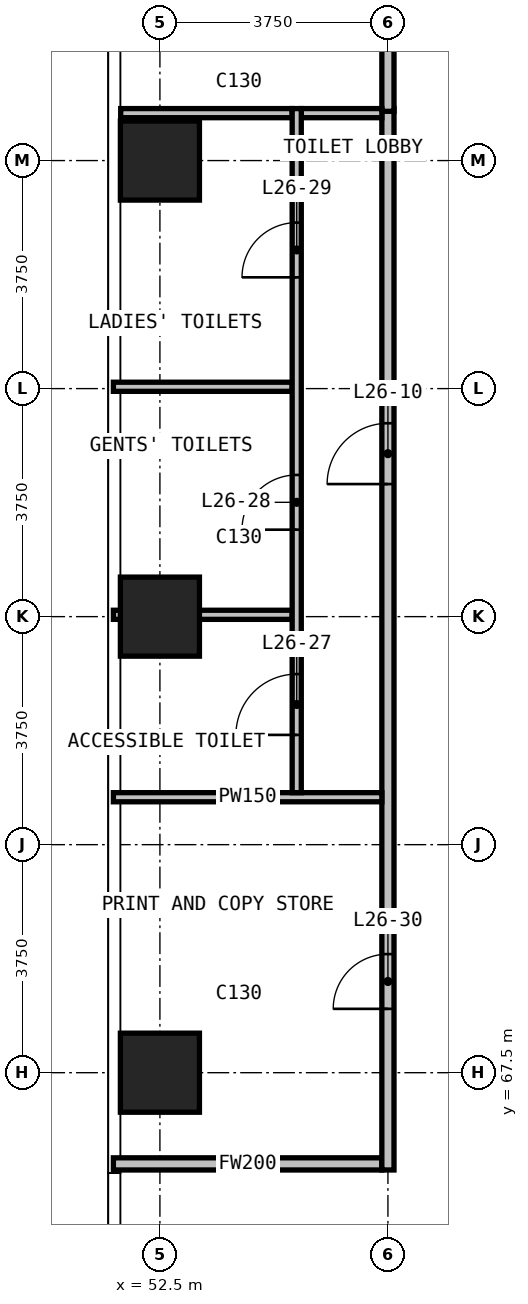
"""IFC4 building model, lengths in metres.
Left out: names, types, materials, properties, quantities, classifications, styles, units other than length and angle.
Written with IfcOpenShell. Run it as: python <this file> out.ifc"""

import sys

from ifc_helpers import new_model, si_unit, direction, frame, frame_2d, origin, origin_2d, place, context, subcontext, project, spatial, rectangle, extrude, element, fill, save


model = new_model("IFC4")
c1 = context("Model", 3, precision=1e-05, world=origin(), true_north=direction((0.0, 1.0)))
c2 = subcontext(c1, "Body", "Model", "MODEL_VIEW")
j1 = project(units=[si_unit("LENGTHUNIT", "METRE"), si_unit("PLANEANGLEUNIT", "RADIAN")], contexts=[c1])
p1 = place(None, origin())
s1 = spatial("IfcSite", under=j1, at=p1, CompositionType="ELEMENT")
p2 = place(p1, origin())
s2 = spatial("IfcBuilding", under=s1, at=p2, CompositionType="ELEMENT")
p3 = place(p2, frame((0.0, 0.0, 107.2)))
s3 = spatial("IfcBuildingStorey", under=s2, at=p3, CompositionType="ELEMENT", Elevation=107.2)
for number, where, z_axis, x_axis in (
    (1, (52.5, 67.5, 0.0), (0.0, 0.0, 1.0), (1.0, 0.0, 0.0)),
    (2, (52.5, 75.0, 0.0), (0.0, 0.0, 1.0), (1.0, 0.0, 0.0)),
    (3, (52.5, 82.5, 0.0), (0.0, 0.0, 1.0), (1.0, 0.0, 0.0)),
):
    element("IfcColumn", number, at=place(p3, frame(where, z_axis=z_axis, x_axis=x_axis)), inside=s3, PredefinedType="COLUMN", context=c2, shape_type="SweptSolid", body=[
        extrude(rectangle(XDim=1.3, YDim=1.3, at=origin_2d()), origin(), (0.0, 0.0, 1.0), 3.6),
    ])
p4 = place(p3, frame((51.735, 66.0, 0.0), z_axis=(0.0, 0.0, 1.0), x_axis=(1.0, 0.0, 0.0)))
e4 = element("IfcWall", 4, at=p4, inside=s3, PredefinedType="PARTITIONING", context=c2, shape_type="SweptSolid", body=[
    extrude(rectangle(XDim=4.415, YDim=0.2, at=frame_2d((2.208, 0.0))), origin(), (0.0, 0.0, 1.0), 3.3),
])
p5 = place(p3, frame((56.25, 65.9, 0.0), z_axis=(0.0, 0.0, 1.0), x_axis=(0.0, 1.0, 0.0)))
e5 = element("IfcWall", 5, at=p5, inside=s3, PredefinedType="PARTITIONING", context=c2, shape_type="SweptSolid", body=[
    extrude(rectangle(XDim=17.455, YDim=0.2, at=frame_2d((8.728, 0.0))), origin(), (0.0, 0.0, 1.0), 3.3),
])
p6 = place(p5, frame((11.28, 0.0, 0.0)))
e6 = element("IfcOpeningElement", 6, at=p6, cuts=e5, PredefinedType="OPENING", context=c2, shape_type="SweptSolid", body=[
    extrude(rectangle(XDim=1.0, YDim=2.2, at=frame_2d((0.5, 1.1))), frame((0.0, 0.11, 0.0), z_axis=(0.0, -1.0, 0.0), x_axis=(1.0, 0.0, 0.0)), (0.0, 0.0, 1.0), 0.22),
])
p7 = place(p5, frame((2.65, 0.0, 0.0)))
e7 = element("IfcOpeningElement", 7, at=p7, cuts=e5, PredefinedType="OPENING", context=c2, shape_type="SweptSolid", body=[
    extrude(rectangle(XDim=0.9, YDim=2.2, at=frame_2d((0.45, 1.1))), frame((0.0, 0.11, 0.0), z_axis=(0.0, -1.0, 0.0), x_axis=(1.0, 0.0, 0.0)), (0.0, 0.0, 1.0), 0.22),
])
p8 = place(p3, frame((56.25, 83.31, 0.0), z_axis=(0.0, 0.0, 1.0), x_axis=(0.0, 1.0, 0.0)))
e8 = element("IfcWall", 8, at=p8, inside=s3, PredefinedType="PARTITIONING", context=c2, shape_type="SweptSolid", body=[
    extrude(rectangle(XDim=7.335, YDim=0.2, at=frame_2d((3.667, 0.0))), origin(), (0.0, 0.0, 1.0), 3.3),
])
p9 = place(p3, frame((51.735, 72.03, 0.0), z_axis=(0.0, 0.0, 1.0), x_axis=(1.0, 0.0, 0.0)))
e9 = element("IfcWall", 9, at=p9, inside=s3, PredefinedType="PARTITIONING", context=c2, shape_type="SweptSolid", body=[
    extrude(rectangle(XDim=4.415, YDim=0.15, at=frame_2d((2.208, 0.0))), origin(), (0.0, 0.0, 1.0), 3.3),
])
for number, where, z_axis, x_axis in (
    (10, (51.735, 75.03, 0.0), (0.0, 0.0, 1.0), (1.0, 0.0, 0.0)),
    (11, (51.735, 78.78, 0.0), (0.0, 0.0, 1.0), (1.0, 0.0, 0.0)),
):
    element("IfcWall", number, at=place(p3, frame(where, z_axis=z_axis, x_axis=x_axis)), inside=s3, PredefinedType="PARTITIONING", context=c2, shape_type="SweptSolid", body=[
        extrude(rectangle(XDim=2.94, YDim=0.15, at=frame_2d((1.47, 0.0))), origin(), (0.0, 0.0, 1.0), 3.3),
    ])
p10 = place(p3, frame((51.855, 83.28, 0.0), z_axis=(0.0, 0.0, 1.0), x_axis=(1.0, 0.0, 0.0)))
e12 = element("IfcWall", 12, at=p10, inside=s3, PredefinedType="PARTITIONING", context=c2, shape_type="SweptSolid", body=[
    extrude(rectangle(XDim=2.82, YDim=0.15, at=frame_2d((1.41, 0.0))), origin(), (0.0, 0.0, 1.0), 3.3),
])
p11 = place(p3, frame((54.825, 83.28, 0.0), z_axis=(0.0, 0.0, 1.0), x_axis=(1.0, 0.0, 0.0)))
e13 = element("IfcWall", 13, at=p11, inside=s3, PredefinedType="PARTITIONING", context=c2, shape_type="SweptSolid", body=[
    extrude(rectangle(XDim=1.325, YDim=0.15, at=frame_2d((0.663, 0.0))), origin(), (0.0, 0.0, 1.0), 3.3),
])
p12 = place(p3, frame((54.75, 72.105, 0.0), z_axis=(0.0, 0.0, 1.0), x_axis=(0.0, 1.0, 0.0)))
e14 = element("IfcWall", 14, at=p12, inside=s3, PredefinedType="PARTITIONING", context=c2, shape_type="SweptSolid", body=[
    extrude(rectangle(XDim=11.25, YDim=0.15, at=frame_2d((5.625, 0.0))), origin(), (0.0, 0.0, 1.0), 3.3),
])
p13 = place(p12, frame((0.95, 0.0, 0.0)))
e15 = element("IfcOpeningElement", 15, at=p13, cuts=e14, PredefinedType="OPENING", context=c2, shape_type="SweptSolid", body=[
    extrude(rectangle(XDim=1.0, YDim=2.2, at=frame_2d((0.5, 1.1))), frame((0.0, 0.085, 0.0), z_axis=(0.0, -1.0, 0.0), x_axis=(1.0, 0.0, 0.0)), (0.0, 0.0, 1.0), 0.17),
])
p14 = place(p12, frame((4.325, 0.0, 0.0)))
e16 = element("IfcOpeningElement", 16, at=p14, cuts=e14, PredefinedType="OPENING", context=c2, shape_type="SweptSolid", body=[
    extrude(rectangle(XDim=0.9, YDim=2.2, at=frame_2d((0.45, 1.1))), frame((0.0, 0.085, 0.0), z_axis=(0.0, -1.0, 0.0), x_axis=(1.0, 0.0, 0.0)), (0.0, 0.0, 1.0), 0.17),
])
p15 = place(p12, frame((8.475, 0.0, 0.0)))
e17 = element("IfcOpeningElement", 17, at=p15, cuts=e14, PredefinedType="OPENING", context=c2, shape_type="SweptSolid", body=[
    extrude(rectangle(XDim=0.9, YDim=2.2, at=frame_2d((0.45, 1.1))), frame((0.0, 0.085, 0.0), z_axis=(0.0, -1.0, 0.0), x_axis=(1.0, 0.0, 0.0)), (0.0, 0.0, 1.0), 0.17),
])
p16 = place(p6, origin())
e18 = element("IfcDoor", 18, at=p16, inside=s3, OperationType="SINGLE_SWING_RIGHT", PredefinedType="DOOR", context=c2, shape_type="SweptSolid", body=[
    extrude(rectangle(XDim=1.0, YDim=2.2, at=frame_2d((0.5, 1.1))), frame((0.0, 0.025, 0.0), z_axis=(0.0, -1.0, 0.0), x_axis=(1.0, 0.0, 0.0)), (0.0, 0.0, 1.0), 0.05),
])
fill(e6, e18)
p17 = place(p13, origin())
e19 = element("IfcDoor", 19, at=p17, inside=s3, OperationType="SINGLE_SWING_LEFT", PredefinedType="DOOR", context=c2, shape_type="SweptSolid", body=[
    extrude(rectangle(XDim=1.0, YDim=2.2, at=frame_2d((0.5, 1.1))), frame((0.0, 0.025, 0.0), z_axis=(0.0, -1.0, 0.0), x_axis=(1.0, 0.0, 0.0)), (0.0, 0.0, 1.0), 0.05),
])
fill(e15, e19)
p18 = place(p14, origin())
e20 = element("IfcDoor", 20, at=p18, inside=s3, OperationType="SINGLE_SWING_RIGHT", PredefinedType="DOOR", context=c2, shape_type="SweptSolid", body=[
    extrude(rectangle(XDim=0.9, YDim=2.2, at=frame_2d((0.45, 1.1))), frame((0.0, 0.025, 0.0), z_axis=(0.0, -1.0, 0.0), x_axis=(1.0, 0.0, 0.0)), (0.0, 0.0, 1.0), 0.05),
])
fill(e16, e20)
p19 = place(p15, origin())
e21 = element("IfcDoor", 21, at=p19, inside=s3, OperationType="SINGLE_SWING_RIGHT", PredefinedType="DOOR", context=c2, shape_type="SweptSolid", body=[
    extrude(rectangle(XDim=0.9, YDim=2.2, at=frame_2d((0.45, 1.1))), frame((0.0, 0.025, 0.0), z_axis=(0.0, -1.0, 0.0), x_axis=(1.0, 0.0, 0.0)), (0.0, 0.0, 1.0), 0.05),
])
fill(e17, e21)
p20 = place(p7, origin())
e22 = element("IfcDoor", 22, at=p20, inside=s3, OperationType="SINGLE_SWING_LEFT", PredefinedType="DOOR", context=c2, shape_type="SweptSolid", body=[
    extrude(rectangle(XDim=0.9, YDim=2.2, at=frame_2d((0.45, 1.1))), frame((0.0, 0.025, 0.0), z_axis=(0.0, -1.0, 0.0), x_axis=(1.0, 0.0, 0.0)), (0.0, 0.0, 1.0), 0.05),
])
fill(e7, e22)
save(model, sys.argv[1])
